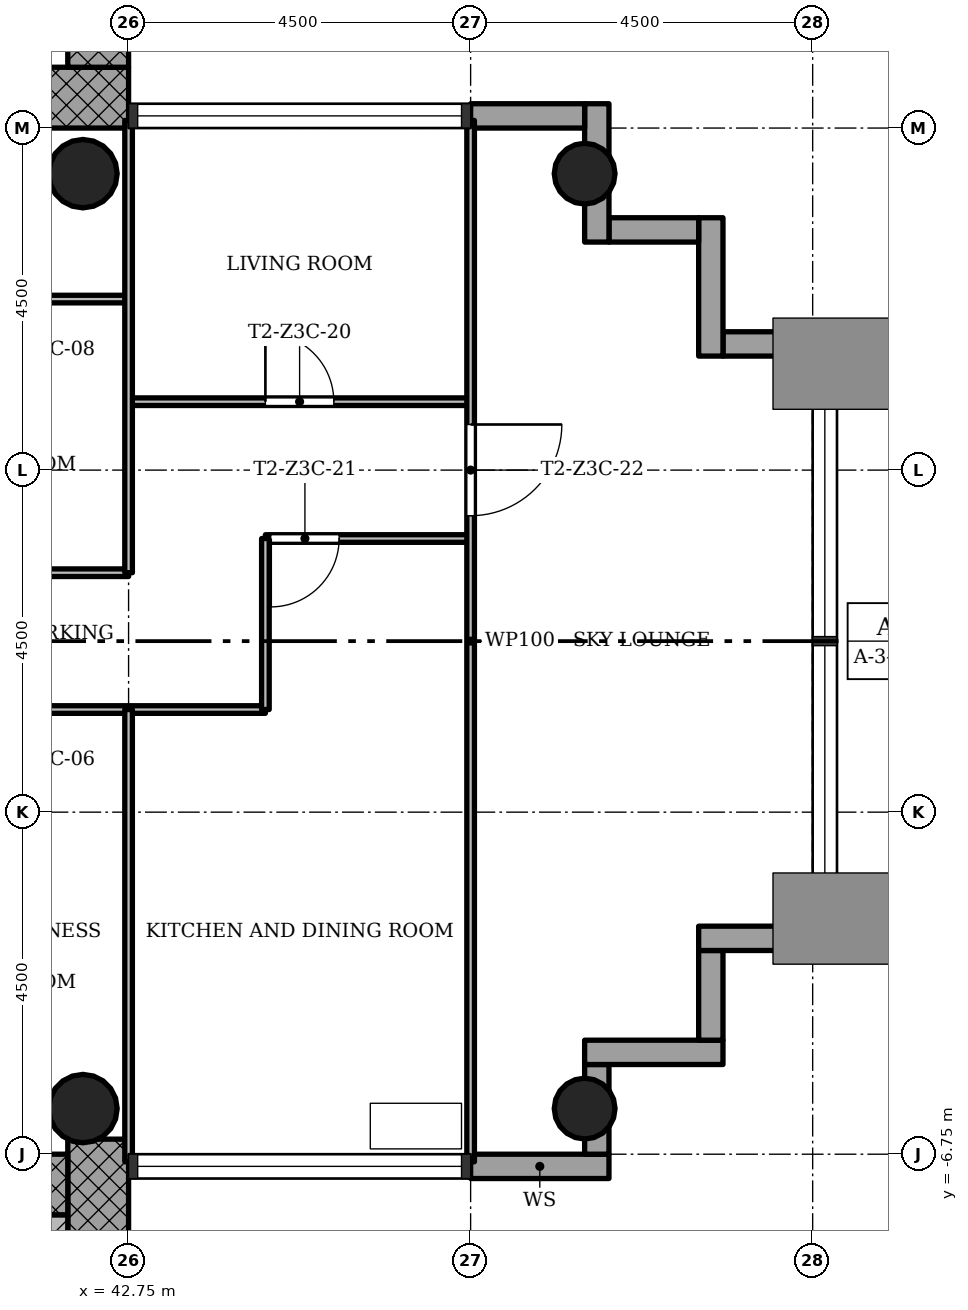
"""IFC4 building model, lengths in metres.
Left out: names, types, materials, properties, quantities, classifications, styles, units other than length and angle.
Written with IfcOpenShell. Run it as: python <this file> out.ifc"""

import sys

from ifc_helpers import new_model, si_unit, direction, frame, frame_2d, origin, origin_2d, place, context, subcontext, project, spatial, rectangle, hollow_circle, extrude, element, fill, save


model = new_model("IFC4")
c1 = context("Model", 3, precision=1e-05, world=origin(), true_north=direction((0.0, 1.0)))
c2 = subcontext(c1, "Body", "Model", "MODEL_VIEW")
j1 = project(units=[si_unit("LENGTHUNIT", "METRE"), si_unit("PLANEANGLEUNIT", "RADIAN")], contexts=[c1])
p1 = place(None, origin())
s1 = spatial("IfcSite", under=j1, at=p1, CompositionType="ELEMENT")
p2 = place(p1, origin())
s2 = spatial("IfcBuilding", under=s1, at=p2, CompositionType="ELEMENT")
p3 = place(p2, frame((0.0, 0.0, 157.5)))
s3 = spatial("IfcBuildingStorey", under=s2, at=p3, CompositionType="ELEMENT", Elevation=157.5)
p4 = place(p3, frame((30.05, 7.15, 0.0), z_axis=(0.0, 0.0, 1.0), x_axis=(1.0, 0.0, 0.0)))
e1 = element("IfcWall", 1, at=p4, inside=s3, PredefinedType="SHEAR", context=c2, shape_type="SweptSolid", body=[
    extrude(rectangle(XDim=12.7, YDim=0.8, at=frame_2d((6.35, 0.0))), origin(), (0.0, 0.0, 1.0), 3.4),
])
p5 = place(p4, frame((5.05, 0.0, 0.0)))
e2 = element("IfcOpeningElement", 2, at=p5, cuts=e1, PredefinedType="OPENING", context=c2, shape_type="SweptSolid", body=[
    extrude(rectangle(XDim=1.8, YDim=2.1, at=frame_2d((0.9, 1.05))), frame((0.0, 0.41, 0.0), z_axis=(0.0, -1.0, 0.0), x_axis=(1.0, 0.0, 0.0)), (0.0, 0.0, 1.0), 0.82),
])
p6 = place(p3, frame((42.35, 7.55, 0.0), z_axis=(0.0, 0.0, 1.0), x_axis=(0.0, 1.0, 0.0)))
e3 = element("IfcWall", 3, at=p6, inside=s3, PredefinedType="SHEAR", context=c2, shape_type="SweptSolid", body=[
    extrude(rectangle(XDim=8.2, YDim=0.8, at=frame_2d((4.1, 0.0))), origin(), (0.0, 0.0, 1.0), 3.4),
])
p7 = place(p3, frame((42.35, -14.95, 0.0), z_axis=(0.0, 0.0, 1.0), x_axis=(0.0, 1.0, 0.0)))
e4 = element("IfcWall", 4, at=p7, inside=s3, PredefinedType="SHEAR", context=c2, shape_type="SweptSolid", body=[
    extrude(rectangle(XDim=8.398, YDim=0.8, at=frame_2d((4.199, 0.0))), origin(), (0.0, 0.0, 1.0), 3.4),
])
p8 = place(p3, frame((41.95, -7.15, 0.0), z_axis=(0.0, 0.0, 1.0), x_axis=(-1.0, 0.0, 0.0)))
e5 = element("IfcWall", 5, at=p8, inside=s3, PredefinedType="SHEAR", context=c2, shape_type="SweptSolid", body=[
    extrude(rectangle(XDim=12.7, YDim=0.8, at=frame_2d((6.35, 0.0))), origin(), (0.0, 0.0, 1.0), 3.4),
])
p9 = place(p8, frame((5.05, 0.0, 0.0)))
e6 = element("IfcOpeningElement", 6, at=p9, cuts=e5, PredefinedType="OPENING", context=c2, shape_type="SweptSolid", body=[
    extrude(rectangle(XDim=1.8, YDim=2.1, at=frame_2d((0.9, 1.05))), frame((0.0, 0.41, 0.0), z_axis=(0.0, -1.0, 0.0), x_axis=(1.0, 0.0, 0.0)), (0.0, 0.0, 1.0), 0.82),
])
for number, where, z_axis, x_axis in (
    (7, (48.75, -6.15, 0.0), (0.0, 0.0, 1.0), (1.0, 0.0, 0.0)),
    (8, (48.75, 6.15, 0.0), (0.0, 0.0, 1.0), (1.0, 0.0, 0.0)),
):
    element("IfcColumn", number, at=place(p3, frame(where, z_axis=z_axis, x_axis=x_axis)), inside=s3, PredefinedType="COLUMN", context=c2, shape_type="SweptSolid", body=[
        extrude(hollow_circle(Radius=0.4, WallThickness=0.028, at=origin_2d()), origin(), (0.0, 0.0, 1.0), 3.4),
    ])
for number, where, z_axis, x_axis in (
    (9, (42.15, -6.15, 0.0), (0.0, 0.0, 1.0), (1.0, 0.0, 0.0)),
    (10, (42.15, 6.15, 0.0), (0.0, 0.0, 1.0), (1.0, 0.0, 0.0)),
):
    element("IfcColumn", number, at=place(p3, frame(where, z_axis=z_axis, x_axis=x_axis)), inside=s3, PredefinedType="COLUMN", context=c2, shape_type="SweptSolid", body=[
        extrude(hollow_circle(Radius=0.45, WallThickness=0.032, at=origin_2d()), origin(), (0.0, 0.0, 1.0), 3.4),
    ])
p10 = place(p3, frame((47.25, -6.91, -0.3), z_axis=(0.0, 0.0, 1.0), x_axis=(1.0, 0.0, 0.0)))
e11 = element("IfcWall", 11, at=p10, inside=s3, PredefinedType="STANDARD", context=c2, shape_type="SweptSolid", body=[
    extrude(rectangle(XDim=1.82, YDim=0.32, at=frame_2d((0.91, 0.0))), origin(), (0.0, 0.0, 1.0), 3.4),
])
p11 = place(p3, frame((48.91, -6.75, -0.3), z_axis=(0.0, 0.0, 1.0), x_axis=(0.0, 1.0, 0.0)))
e12 = element("IfcWall", 12, at=p11, inside=s3, PredefinedType="STANDARD", context=c2, shape_type="SweptSolid", body=[
    extrude(rectangle(XDim=1.18, YDim=0.32, at=frame_2d((0.59, 0.0))), origin(), (0.0, 0.0, 1.0), 3.4),
])
p12 = place(p3, frame((48.75, -5.41, -0.3), z_axis=(0.0, 0.0, 1.0), x_axis=(1.0, 0.0, 0.0)))
e13 = element("IfcWall", 13, at=p12, inside=s3, PredefinedType="STANDARD", context=c2, shape_type="SweptSolid", body=[
    extrude(rectangle(XDim=1.82, YDim=0.32, at=frame_2d((0.91, 0.0))), origin(), (0.0, 0.0, 1.0), 3.4),
])
p13 = place(p3, frame((50.41, -5.25, -0.3), z_axis=(0.0, 0.0, 1.0), x_axis=(0.0, 1.0, 0.0)))
e14 = element("IfcWall", 14, at=p13, inside=s3, PredefinedType="STANDARD", context=c2, shape_type="SweptSolid", body=[
    extrude(rectangle(XDim=1.18, YDim=0.32, at=frame_2d((0.59, 0.0))), origin(), (0.0, 0.0, 1.0), 3.4),
])
p14 = place(p3, frame((50.25, -3.91, -0.3), z_axis=(0.0, 0.0, 1.0), x_axis=(1.0, 0.0, 0.0)))
e15 = element("IfcWall", 15, at=p14, inside=s3, PredefinedType="STANDARD", context=c2, shape_type="SweptSolid", body=[
    extrude(rectangle(XDim=1.82, YDim=0.32, at=frame_2d((0.91, 0.0))), origin(), (0.0, 0.0, 1.0), 3.4),
])
p15 = place(p3, frame((52.07, 3.91, -0.3), z_axis=(0.0, 0.0, 1.0), x_axis=(-1.0, 0.0, 0.0)))
e16 = element("IfcWall", 16, at=p15, inside=s3, PredefinedType="STANDARD", context=c2, shape_type="SweptSolid", body=[
    extrude(rectangle(XDim=1.5, YDim=0.32, at=frame_2d((0.75, 0.0))), origin(), (0.0, 0.0, 1.0), 3.4),
])
p16 = place(p3, frame((50.41, 3.75, -0.3), z_axis=(0.0, 0.0, 1.0), x_axis=(0.0, 1.0, 0.0)))
e17 = element("IfcWall", 17, at=p16, inside=s3, PredefinedType="STANDARD", context=c2, shape_type="SweptSolid", body=[
    extrude(rectangle(XDim=1.82, YDim=0.32, at=frame_2d((0.91, 0.0))), origin(), (0.0, 0.0, 1.0), 3.4),
])
p17 = place(p3, frame((50.25, 5.41, -0.3), z_axis=(0.0, 0.0, 1.0), x_axis=(-1.0, 0.0, 0.0)))
e18 = element("IfcWall", 18, at=p17, inside=s3, PredefinedType="STANDARD", context=c2, shape_type="SweptSolid", body=[
    extrude(rectangle(XDim=1.18, YDim=0.32, at=frame_2d((0.59, 0.0))), origin(), (0.0, 0.0, 1.0), 3.4),
])
p18 = place(p3, frame((48.91, 5.25, -0.3), z_axis=(0.0, 0.0, 1.0), x_axis=(0.0, 1.0, 0.0)))
e19 = element("IfcWall", 19, at=p18, inside=s3, PredefinedType="STANDARD", context=c2, shape_type="SweptSolid", body=[
    extrude(rectangle(XDim=1.82, YDim=0.32, at=frame_2d((0.91, 0.0))), origin(), (0.0, 0.0, 1.0), 3.4),
])
p19 = place(p3, frame((48.75, 6.91, -0.3), z_axis=(0.0, 0.0, 1.0), x_axis=(-1.0, 0.0, 0.0)))
e20 = element("IfcWall", 20, at=p19, inside=s3, PredefinedType="STANDARD", context=c2, shape_type="SweptSolid", body=[
    extrude(rectangle(XDim=1.5, YDim=0.32, at=frame_2d((0.75, 0.0))), origin(), (0.0, 0.0, 1.0), 3.4),
])
p20 = place(p3, frame((44.55, -0.9, 0.0), z_axis=(0.0, 0.0, 1.0), x_axis=(-1.0, 0.0, 0.0)))
e21 = element("IfcWall", 21, at=p20, inside=s3, PredefinedType="PARTITIONING", context=c2, shape_type="SweptSolid", body=[
    extrude(rectangle(XDim=4.05, YDim=0.1, at=frame_2d((2.025, 0.0))), origin(), (0.0, 0.0, 1.0), 3.0),
])
p21 = place(p3, frame((42.75, 0.9, 0.0), z_axis=(0.0, 0.0, 1.0), x_axis=(-1.0, 0.0, 0.0)))
e22 = element("IfcWall", 22, at=p21, inside=s3, PredefinedType="PARTITIONING", context=c2, shape_type="SweptSolid", body=[
    extrude(rectangle(XDim=2.25, YDim=0.1, at=frame_2d((1.125, 0.0))), origin(), (0.0, 0.0, 1.0), 3.0),
])
p22 = place(p3, frame((47.25, 1.35, 0.0), z_axis=(0.0, 0.0, 1.0), x_axis=(-1.0, 0.0, 0.0)))
e23 = element("IfcWall", 23, at=p22, inside=s3, PredefinedType="PARTITIONING", context=c2, shape_type="SweptSolid", body=[
    extrude(rectangle(XDim=2.7, YDim=0.1, at=frame_2d((1.35, 0.0))), origin(), (0.0, 0.0, 1.0), 3.0),
])
p23 = place(p22, frame((1.73, 0.0, 0.0)))
e24 = element("IfcOpeningElement", 24, at=p23, cuts=e23, PredefinedType="OPENING", context=c2, shape_type="SweptSolid", body=[
    extrude(rectangle(XDim=0.9, YDim=2.1, at=frame_2d((0.45, 1.05))), frame((0.0, 0.06, 0.0), z_axis=(0.0, -1.0, 0.0), x_axis=(1.0, 0.0, 0.0)), (0.0, 0.0, 1.0), 0.12),
])
p24 = place(p3, frame((47.25, 3.15, 0.0), z_axis=(0.0, 0.0, 1.0), x_axis=(-1.0, 0.0, 0.0)))
e25 = element("IfcWall", 25, at=p24, inside=s3, PredefinedType="PARTITIONING", context=c2, shape_type="SweptSolid", body=[
    extrude(rectangle(XDim=4.5, YDim=0.1, at=frame_2d((2.25, 0.0))), origin(), (0.0, 0.0, 1.0), 3.0),
])
p25 = place(p24, frame((1.8, 0.0, 0.0)))
e26 = element("IfcOpeningElement", 26, at=p25, cuts=e25, PredefinedType="OPENING", context=c2, shape_type="SweptSolid", body=[
    extrude(rectangle(XDim=0.9, YDim=2.1, at=frame_2d((0.45, 1.05))), frame((0.0, 0.06, 0.0), z_axis=(0.0, -1.0, 0.0), x_axis=(1.0, 0.0, 0.0)), (0.0, 0.0, 1.0), 0.12),
])
p26 = place(p3, frame((42.75, 4.5, 0.0), z_axis=(0.0, 0.0, 1.0), x_axis=(-1.0, 0.0, 0.0)))
e27 = element("IfcWall", 27, at=p26, inside=s3, PredefinedType="PARTITIONING", context=c2, shape_type="SweptSolid", body=[
    extrude(rectangle(XDim=5.25, YDim=0.1, at=frame_2d((2.625, 0.0))), origin(), (0.0, 0.0, 1.0), 3.0),
])
p27 = place(p26, frame((3.3, 0.0, 0.0)))
e28 = element("IfcOpeningElement", 28, at=p27, cuts=e27, PredefinedType="OPENING", context=c2, shape_type="SweptSolid", body=[
    extrude(rectangle(XDim=0.9, YDim=2.1, at=frame_2d((0.45, 1.05))), frame((0.0, 0.06, 0.0), z_axis=(0.0, -1.0, 0.0), x_axis=(1.0, 0.0, 0.0)), (0.0, 0.0, 1.0), 0.12),
])
p28 = place(p3, frame((47.25, -6.85, 0.0), z_axis=(0.0, 0.0, 1.0), x_axis=(0.0, 1.0, 0.0)))
e29 = element("IfcWall", 29, at=p28, inside=s3, PredefinedType="PARTITIONING", context=c2, shape_type="SweptSolid", body=[
    extrude(rectangle(XDim=13.7, YDim=0.1, at=frame_2d((6.85, 0.0))), origin(), (0.0, 0.0, 1.0), 3.0),
])
p29 = place(p28, frame((8.5, 0.0, 0.0)))
e30 = element("IfcOpeningElement", 30, at=p29, cuts=e29, PredefinedType="OPENING", context=c2, shape_type="SweptSolid", body=[
    extrude(rectangle(XDim=1.2, YDim=2.1, at=frame_2d((0.6, 1.05))), frame((0.0, 0.06, 0.0), z_axis=(0.0, -1.0, 0.0), x_axis=(1.0, 0.0, 0.0)), (0.0, 0.0, 1.0), 0.12),
])
p30 = place(p3, frame((44.55, -0.9, 0.0), z_axis=(0.0, 0.0, 1.0), x_axis=(0.0, 1.0, 0.0)))
e31 = element("IfcWall", 31, at=p30, inside=s3, PredefinedType="PARTITIONING", context=c2, shape_type="SweptSolid", body=[
    extrude(rectangle(XDim=2.25, YDim=0.1, at=frame_2d((1.125, 0.0))), origin(), (0.0, 0.0, 1.0), 3.0),
])
for number, where, z_axis, x_axis in (
    (32, (42.75, -6.85, 0.0), (0.0, 0.0, 1.0), (0.0, 1.0, 0.0)),
    (33, (42.75, 0.9, 0.0), (0.0, 0.0, 1.0), (0.0, 1.0, 0.0)),
):
    element("IfcWall", number, at=place(p3, frame(where, z_axis=z_axis, x_axis=x_axis)), inside=s3, PredefinedType="PARTITIONING", context=c2, shape_type="SweptSolid", body=[
        extrude(rectangle(XDim=5.95, YDim=0.1, at=frame_2d((2.975, 0.0))), origin(), (0.0, 0.0, 1.0), 3.0),
    ])
p31 = place(p3, frame((37.85, -7.75, 0.0), z_axis=(0.0, 0.0, 1.0), x_axis=(1.0, 0.0, 0.0)))
e34 = element("IfcWall", 34, at=p31, inside=s3, PredefinedType="SHEAR", context=c2, shape_type="SweptSolid", body=[
    extrude(rectangle(XDim=4.1, YDim=0.4, at=frame_2d((2.05, 0.0))), origin(), (0.0, 0.0, 1.0), 3.4),
])
p32 = place(p25, origin())
e35 = element("IfcDoor", 35, at=p32, inside=s3, OperationType="SINGLE_SWING_RIGHT", PredefinedType="DOOR", context=c2, shape_type="SweptSolid", body=[
    extrude(rectangle(XDim=0.9, YDim=2.1, at=frame_2d((0.45, 1.05))), frame((0.0, 0.025, 0.0), z_axis=(0.0, -1.0, 0.0), x_axis=(1.0, 0.0, 0.0)), (0.0, 0.0, 1.0), 0.05),
])
fill(e26, e35)
p33 = place(p23, origin())
e36 = element("IfcDoor", 36, at=p33, inside=s3, OperationType="SINGLE_SWING_LEFT", PredefinedType="DOOR", context=c2, shape_type="SweptSolid", body=[
    extrude(rectangle(XDim=0.9, YDim=2.1, at=frame_2d((0.45, 1.05))), frame((0.0, 0.025, 0.0), z_axis=(0.0, -1.0, 0.0), x_axis=(1.0, 0.0, 0.0)), (0.0, 0.0, 1.0), 0.05),
])
fill(e24, e36)
p34 = place(p29, origin())
e37 = element("IfcDoor", 37, at=p34, inside=s3, OperationType="SINGLE_SWING_RIGHT", PredefinedType="DOOR", context=c2, shape_type="SweptSolid", body=[
    extrude(rectangle(XDim=1.2, YDim=2.1, at=frame_2d((0.6, 1.05))), frame((0.0, 0.025, 0.0), z_axis=(0.0, -1.0, 0.0), x_axis=(1.0, 0.0, 0.0)), (0.0, 0.0, 1.0), 0.05),
])
fill(e30, e37)
save(model, sys.argv[1])
